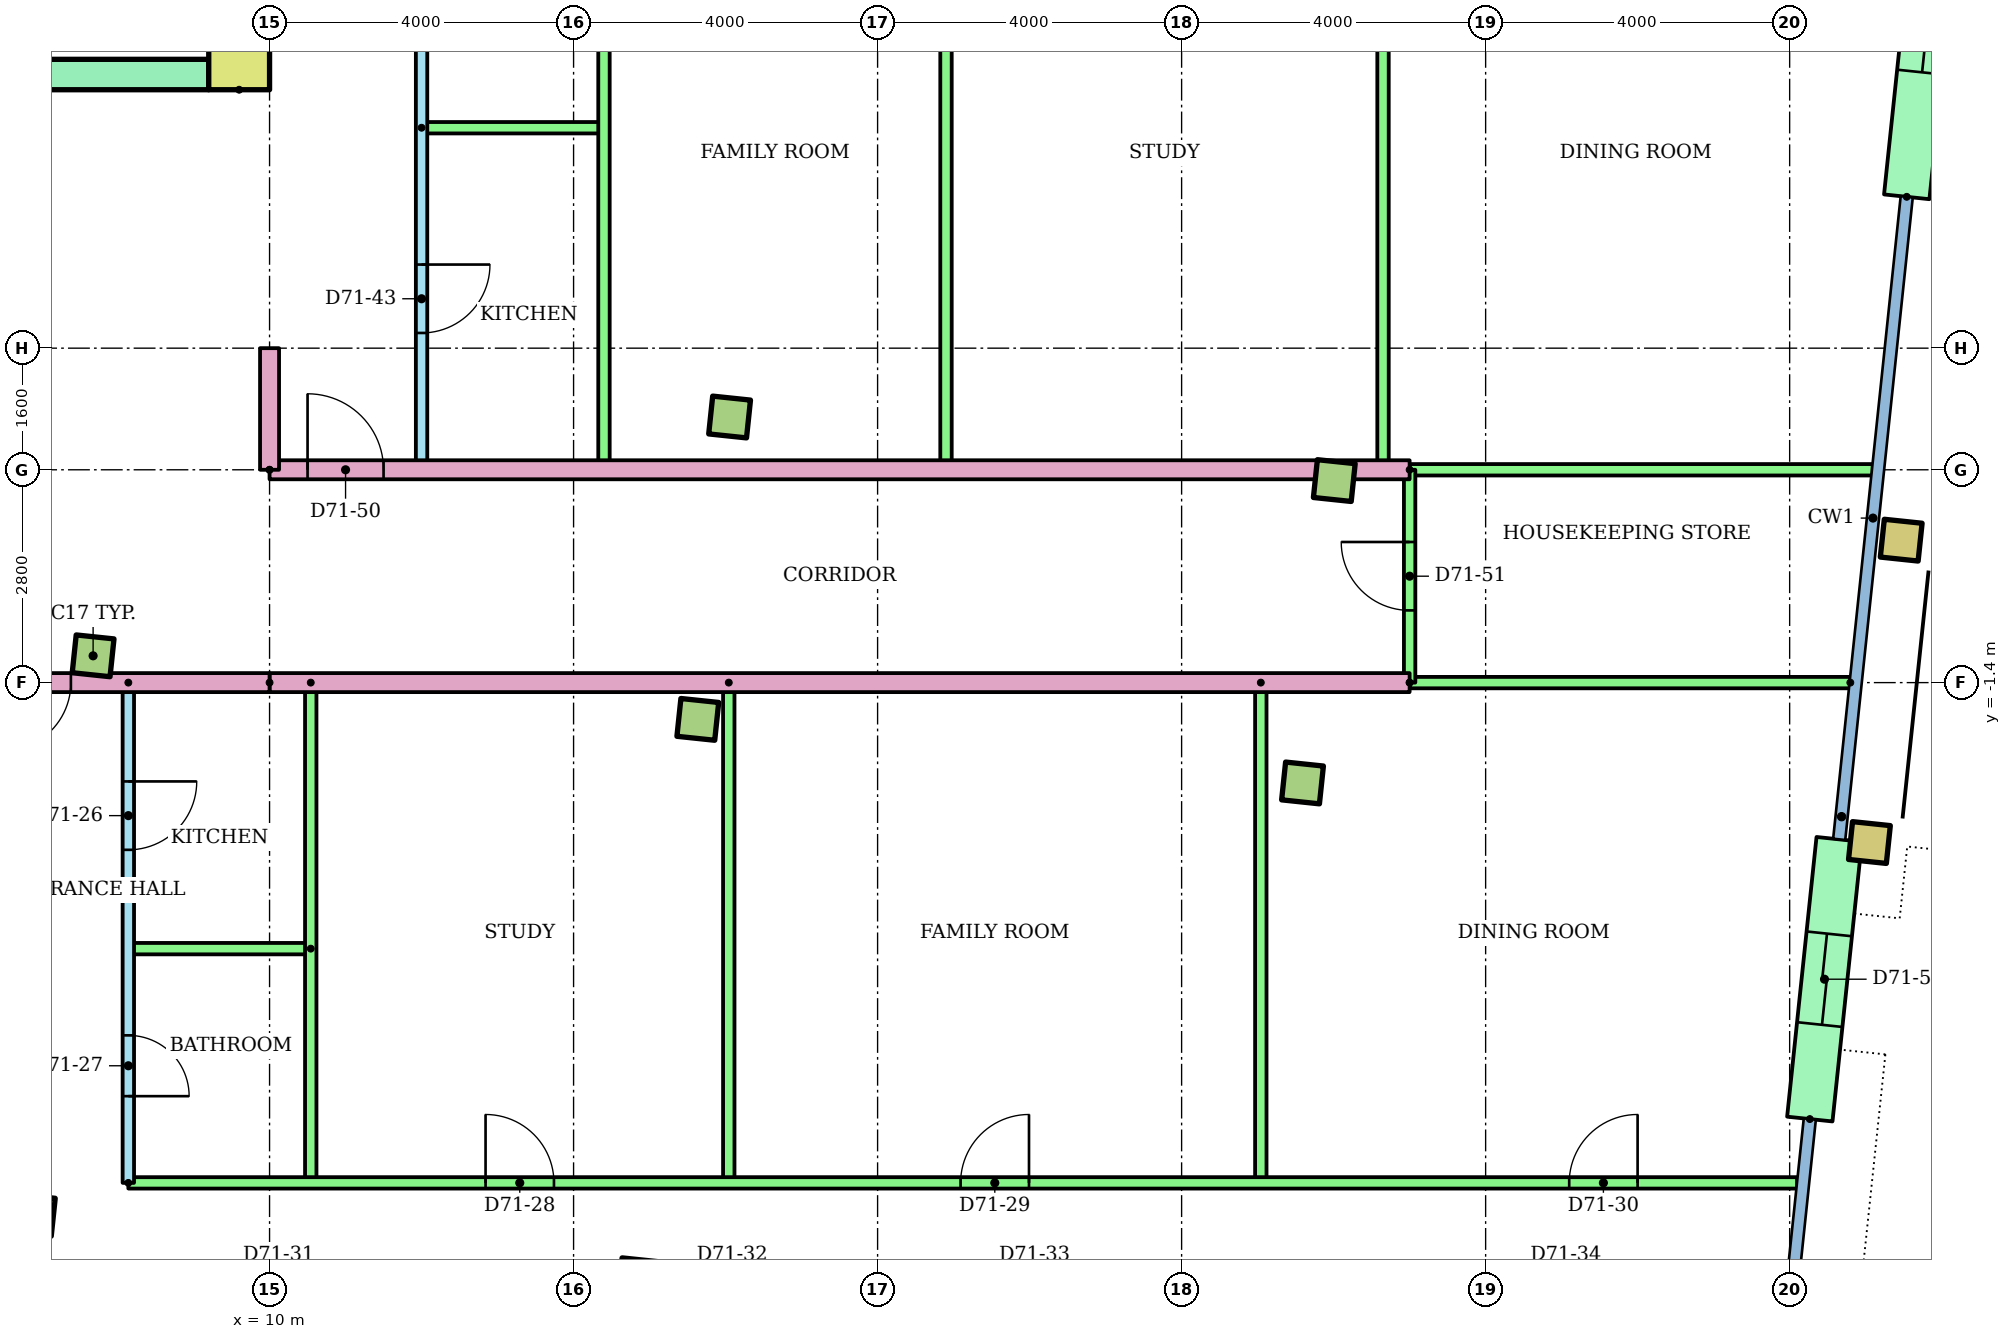
"""IFC4 building model, lengths in metres.
Left out: names, types, materials, properties, quantities, classifications, styles, units other than length and angle.
Written with IfcOpenShell. Run it as: python <this file> out.ifc"""

import sys

from ifc_helpers import new_model, si_unit, direction, frame, frame_2d, origin, origin_2d, place, context, subcontext, project, spatial, rectangle, hollow_rectangle, extrude, element, fill, save


model = new_model("IFC4")
c1 = context("Model", 3, precision=1e-05, world=origin(), true_north=direction((0.0, 1.0)))
c2 = subcontext(c1, "Body", "Model", "MODEL_VIEW")
j1 = project(units=[si_unit("LENGTHUNIT", "METRE"), si_unit("PLANEANGLEUNIT", "RADIAN")], contexts=[c1])
p1 = place(None, origin())
s1 = spatial("IfcSite", under=j1, at=p1, CompositionType="ELEMENT")
p2 = place(p1, origin())
s2 = spatial("IfcBuilding", under=s1, at=p2, CompositionType="ELEMENT")
p3 = place(p2, frame((0.0, 0.0, 272.3)))
s3 = spatial("IfcBuildingStorey", under=s2, at=p3, CompositionType="ELEMENT", Elevation=272.3)
for number, where, z_axis, x_axis in (
    (1, (6.905, -8.407, 0.0), (0.0, 0.0, 1.0), (0.995, -0.105, 0.0)),
    (2, (14.861, -9.243, 0.0), (0.0, 0.0, 1.0), (0.995, -0.105, 0.0)),
    (3, (7.678, -1.048, 0.0), (0.0, 0.0, 1.0), (0.995, -0.105, 0.0)),
    (4, (15.635, -1.884, 0.0), (0.0, 0.0, 1.0), (0.995, -0.105, 0.0)),
    (5, (23.591, -2.72, 0.0), (0.0, 0.0, 1.0), (0.995, -0.105, 0.0)),
):
    element("IfcColumn", number, at=place(p3, frame(where, z_axis=z_axis, x_axis=x_axis)), inside=s3, PredefinedType="COLUMN", context=c2, shape_type="SweptSolid", body=[
        extrude(rectangle(XDim=0.5, YDim=0.5, at=origin_2d()), origin(), (0.0, 0.0, 1.0), 3.2),
    ])
p4 = place(p3, frame((31.05, -3.504, 0.0), z_axis=(0.0, 0.0, 1.0), x_axis=(0.994521895368, -0.104528463268, 0.0)))
e6 = element("IfcColumn", 6, at=p4, inside=s3, PredefinedType="COLUMN", context=c2, shape_type="SweptSolid", body=[
    extrude(hollow_rectangle(XDim=0.5, YDim=0.5, WallThickness=0.025, at=origin_2d()), origin(), (0.0, 0.0, 1.0), 3.2),
])
for number, where, z_axis, x_axis in (
    (7, (16.053, 2.094, 0.0), (0.0, 0.0, 1.0), (0.995, -0.105, 0.0)),
    (8, (24.009, 1.258, 0.0), (0.0, 0.0, 1.0), (0.995, -0.105, 0.0)),
):
    element("IfcColumn", number, at=place(p3, frame(where, z_axis=z_axis, x_axis=x_axis)), inside=s3, PredefinedType="COLUMN", context=c2, shape_type="SweptSolid", body=[
        extrude(rectangle(XDim=0.5, YDim=0.5, at=origin_2d()), origin(), (0.0, 0.0, 1.0), 3.2),
    ])
p5 = place(p3, frame((31.468, 0.474, 0.0), z_axis=(0.0, 0.0, 1.0), x_axis=(0.994521895368, -0.104528463268, 0.0)))
e9 = element("IfcColumn", 9, at=p5, inside=s3, PredefinedType="COLUMN", context=c2, shape_type="SweptSolid", body=[
    extrude(hollow_rectangle(XDim=0.5, YDim=0.5, WallThickness=0.025, at=origin_2d()), origin(), (0.0, 0.0, 1.0), 3.2),
])
p6 = place(p3, frame((30.265, -7.142, 0.0), z_axis=(0.0, 0.0, 1.0), x_axis=(0.104513052986, 0.994523514933, 0.0)))
e10 = element("IfcWall", 10, at=p6, inside=s3, PredefinedType="STANDARD", context=c2, shape_type="SweptSolid", body=[
    extrude(rectangle(XDim=3.7, YDim=0.6, at=frame_2d((1.85, 0.0))), origin(), (0.0, 0.0, 1.0), 2.92),
])
p7 = place(p6, frame((1.25, 0.0, 0.0)))
e11 = element("IfcOpeningElement", 11, at=p7, cuts=e10, PredefinedType="OPENING", context=c2, shape_type="SweptSolid", body=[
    extrude(rectangle(XDim=1.2, YDim=2.1, at=frame_2d((0.6, 1.05))), frame((0.0, 0.31, 0.0), z_axis=(0.0, -1.0, 0.0), x_axis=(1.0, 0.0, 0.0)), (0.0, 0.0, 1.0), 0.62),
])
p8 = place(p3, frame((31.54, 4.991, 0.0), z_axis=(0.0, 0.0, 1.0), x_axis=(0.104546400045, 0.994520009974, 0.0)))
e12 = element("IfcWall", 12, at=p8, inside=s3, PredefinedType="STANDARD", context=c2, shape_type="SweptSolid", body=[
    extrude(rectangle(XDim=4.5, YDim=0.6, at=frame_2d((2.25, 0.0))), origin(), (0.0, 0.0, 1.0), 2.92),
])
p9 = place(p8, frame((1.65, 0.0, 0.0)))
e13 = element("IfcOpeningElement", 13, at=p9, cuts=e12, PredefinedType="OPENING", context=c2, shape_type="SweptSolid", body=[
    extrude(rectangle(XDim=1.2, YDim=2.1, at=frame_2d((0.6, 1.05))), frame((0.0, 0.31, 0.0), z_axis=(0.0, -1.0, 0.0), x_axis=(1.0, 0.0, 0.0)), (0.0, 0.0, 1.0), 0.62),
])
p10 = place(p3, frame((9.6, 6.4, 0.0), z_axis=(0.0, 0.0, 1.0), x_axis=(0.0, 1.0, 0.0)))
e14 = element("IfcWall", 14, at=p10, inside=s3, PredefinedType="SHEAR", context=c2, shape_type="SweptSolid", body=[
    extrude(rectangle(XDim=13.6, YDim=0.8, at=frame_2d((6.8, 0.0))), origin(), (0.0, 0.0, 1.0), 2.92),
])
p11 = place(p3, frame((-9.2, 6.6, 0.0)))
e15 = element("IfcWall", 15, at=p11, inside=s3, PredefinedType="SHEAR", context=c2, shape_type="SweptSolid", body=[
    extrude(rectangle(XDim=18.4, YDim=0.4, at=frame_2d((9.2, 0.0))), origin(), (0.0, 0.0, 1.0), 2.92),
])
p12 = place(p11, frame((8.3, 0.0, 0.0)))
e16 = element("IfcOpeningElement", 16, at=p12, cuts=e15, PredefinedType="OPENING", context=c2, shape_type="SweptSolid", body=[
    extrude(rectangle(XDim=1.8, YDim=2.1, at=frame_2d((0.9, 1.05))), frame((0.0, 0.21, 0.0), z_axis=(0.0, -1.0, 0.0), x_axis=(1.0, 0.0, 0.0)), (0.0, 0.0, 1.0), 0.42),
])
p13 = place(p11, frame((3.8, 0.0, 0.0)))
e17 = element("IfcOpeningElement", 17, at=p13, cuts=e15, PredefinedType="OPENING", context=c2, shape_type="SweptSolid", body=[
    extrude(rectangle(XDim=1.8, YDim=2.1, at=frame_2d((0.9, 1.05))), frame((0.0, 0.21, 0.0), z_axis=(0.0, -1.0, 0.0), x_axis=(1.0, 0.0, 0.0)), (0.0, 0.0, 1.0), 0.42),
])
p14 = place(p11, frame((12.8, 0.0, 0.0)))
e18 = element("IfcOpeningElement", 18, at=p14, cuts=e15, PredefinedType="OPENING", context=c2, shape_type="SweptSolid", body=[
    extrude(rectangle(XDim=1.8, YDim=2.1, at=frame_2d((0.9, 1.05))), frame((0.0, 0.21, 0.0), z_axis=(0.0, -1.0, 0.0), x_axis=(1.0, 0.0, 0.0)), (0.0, 0.0, 1.0), 0.42),
])
p15 = place(p3, frame((8.142, -1.4, 0.0), z_axis=(0.0, 0.0, 1.0), x_axis=(0.0, -1.0, 0.0)))
e19 = element("IfcWall", 19, at=p15, inside=s3, PredefinedType="PARTITIONING", context=c2, shape_type="SweptSolid", body=[
    extrude(rectangle(XDim=6.582, YDim=0.15, at=frame_2d((3.291, 0.0))), origin(), (0.0, 0.0, 1.0), 2.4),
])
p16 = place(p15, frame((1.3, 0.0, 0.0)))
e20 = element("IfcOpeningElement", 20, at=p16, cuts=e19, PredefinedType="OPENING", context=c2, shape_type="SweptSolid", body=[
    extrude(rectangle(XDim=0.9, YDim=2.1, at=frame_2d((0.45, 1.05))), frame((0.0, 0.085, 0.0), z_axis=(0.0, -1.0, 0.0), x_axis=(1.0, 0.0, 0.0)), (0.0, 0.0, 1.0), 0.17),
])
p17 = place(p15, frame((4.641, 0.0, 0.0)))
e21 = element("IfcOpeningElement", 21, at=p17, cuts=e19, PredefinedType="OPENING", context=c2, shape_type="SweptSolid", body=[
    extrude(rectangle(XDim=0.8, YDim=2.1, at=frame_2d((0.4, 1.05))), frame((0.0, 0.085, 0.0), z_axis=(0.0, -1.0, 0.0), x_axis=(1.0, 0.0, 0.0)), (0.0, 0.0, 1.0), 0.17),
])
p18 = place(p3, frame((10.542, -4.9, 0.0), z_axis=(0.0, 0.0, 1.0), x_axis=(-1.0, 0.0, 0.0)))
e22 = element("IfcWall", 22, at=p18, inside=s3, PredefinedType="PARTITIONING", context=c2, shape_type="SweptSolid", body=[
    extrude(rectangle(XDim=2.4, YDim=0.15, at=frame_2d((1.2, 0.0))), origin(), (0.0, 0.0, 1.0), 2.4),
])
for number, where, z_axis, x_axis in (
    (23, (10.542, -1.4, 0.0), (0.0, 0.0, 1.0), (0.0, -1.0, 0.0)),
    (24, (16.042, -1.4, 0.0), (0.0, 0.0, 1.0), (0.0, -1.0, 0.0)),
    (25, (23.042, -1.4, 0.0), (0.0, 0.0, 1.0), (0.0, -1.0, 0.0)),
):
    element("IfcWall", number, at=place(p3, frame(where, z_axis=z_axis, x_axis=x_axis)), inside=s3, PredefinedType="PARTITIONING", context=c2, shape_type="SweptSolid", body=[
        extrude(rectangle(XDim=6.582, YDim=0.15, at=frame_2d((3.291, 0.0))), origin(), (0.0, 0.0, 1.0), 2.4),
    ])
p19 = place(p3, frame((8.142, -7.982, 0.0)))
e26 = element("IfcWall", 26, at=p19, inside=s3, PredefinedType="PARTITIONING", context=c2, shape_type="SweptSolid", body=[
    extrude(rectangle(XDim=21.955, YDim=0.15, at=frame_2d((10.978, 0.0))), origin(), (0.0, 0.0, 1.0), 2.4),
])
p20 = place(p19, frame((4.7, 0.0, 0.0)))
e27 = element("IfcOpeningElement", 27, at=p20, cuts=e26, PredefinedType="OPENING", context=c2, shape_type="SweptSolid", body=[
    extrude(rectangle(XDim=0.9, YDim=2.1, at=frame_2d((0.45, 1.05))), frame((0.0, 0.085, 0.0), z_axis=(0.0, -1.0, 0.0), x_axis=(1.0, 0.0, 0.0)), (0.0, 0.0, 1.0), 0.17),
])
p21 = place(p19, frame((10.95, 0.0, 0.0)))
e28 = element("IfcOpeningElement", 28, at=p21, cuts=e26, PredefinedType="OPENING", context=c2, shape_type="SweptSolid", body=[
    extrude(rectangle(XDim=0.9, YDim=2.1, at=frame_2d((0.45, 1.05))), frame((0.0, 0.085, 0.0), z_axis=(0.0, -1.0, 0.0), x_axis=(1.0, 0.0, 0.0)), (0.0, 0.0, 1.0), 0.17),
])
p22 = place(p19, frame((18.958, 0.0, 0.0)))
e29 = element("IfcOpeningElement", 29, at=p22, cuts=e26, PredefinedType="OPENING", context=c2, shape_type="SweptSolid", body=[
    extrude(rectangle(XDim=0.9, YDim=2.1, at=frame_2d((0.45, 1.05))), frame((0.0, 0.085, 0.0), z_axis=(0.0, -1.0, 0.0), x_axis=(1.0, 0.0, 0.0)), (0.0, 0.0, 1.0), 0.17),
])
p23 = place(p3, frame((25.0, -1.4, 0.0), z_axis=(0.0, 0.0, 1.0), x_axis=(-1.0, 0.0, 0.0)))
e30 = element("IfcWall", 30, at=p23, inside=s3, PredefinedType="PARTITIONING", context=c2, shape_type="SweptSolid", body=[
    extrude(rectangle(XDim=15.0, YDim=0.25, at=frame_2d((7.5, 0.0))), origin(), (0.0, 0.0, 1.0), 2.4),
])
p24 = place(p3, frame((30.798, -1.4, 0.0), z_axis=(0.0, 0.0, 1.0), x_axis=(-1.0, 0.0, 0.0)))
e31 = element("IfcWall", 31, at=p24, inside=s3, PredefinedType="PARTITIONING", context=c2, shape_type="SweptSolid", body=[
    extrude(rectangle(XDim=5.798, YDim=0.15, at=frame_2d((2.899, 0.0))), origin(), (0.0, 0.0, 1.0), 2.4),
])
p25 = place(p3, frame((12.0, 9.743, 0.0), z_axis=(0.0, 0.0, 1.0), x_axis=(0.0, -1.0, 0.0)))
e32 = element("IfcWall", 32, at=p25, inside=s3, PredefinedType="PARTITIONING", context=c2, shape_type="SweptSolid", body=[
    extrude(rectangle(XDim=8.344, YDim=0.15, at=frame_2d((4.172, 0.0))), origin(), (0.0, 0.0, 1.0), 2.4),
])
p26 = place(p25, frame((5.643, 0.0, 0.0)))
e33 = element("IfcOpeningElement", 33, at=p26, cuts=e32, PredefinedType="OPENING", context=c2, shape_type="SweptSolid", body=[
    extrude(rectangle(XDim=0.9, YDim=2.1, at=frame_2d((0.45, 1.05))), frame((0.0, 0.085, 0.0), z_axis=(0.0, -1.0, 0.0), x_axis=(1.0, 0.0, 0.0)), (0.0, 0.0, 1.0), 0.17),
])
p27 = place(p25, frame((1.522, 0.0, 0.0)))
e34 = element("IfcOpeningElement", 34, at=p27, cuts=e32, PredefinedType="OPENING", context=c2, shape_type="SweptSolid", body=[
    extrude(rectangle(XDim=0.8, YDim=2.1, at=frame_2d((0.4, 1.05))), frame((0.0, 0.085, 0.0), z_axis=(0.0, -1.0, 0.0), x_axis=(1.0, 0.0, 0.0)), (0.0, 0.0, 1.0), 0.17),
])
p28 = place(p3, frame((12.0, 5.9, 0.0)))
e35 = element("IfcWall", 35, at=p28, inside=s3, PredefinedType="PARTITIONING", context=c2, shape_type="SweptSolid", body=[
    extrude(rectangle(XDim=2.4, YDim=0.15, at=frame_2d((1.2, 0.0))), origin(), (0.0, 0.0, 1.0), 2.4),
])
for number, where, z_axis, x_axis in (
    (36, (14.4, 9.743, 0.0), (0.0, 0.0, 1.0), (0.0, -1.0, 0.0)),
    (37, (18.9, 9.743, 0.0), (0.0, 0.0, 1.0), (0.0, -1.0, 0.0)),
    (38, (24.65, 9.743, 0.0), (0.0, 0.0, 1.0), (0.0, -1.0, 0.0)),
):
    element("IfcWall", number, at=place(p3, frame(where, z_axis=z_axis, x_axis=x_axis)), inside=s3, PredefinedType="PARTITIONING", context=c2, shape_type="SweptSolid", body=[
        extrude(rectangle(XDim=8.344, YDim=0.15, at=frame_2d((4.172, 0.0))), origin(), (0.0, 0.0, 1.0), 2.4),
    ])
p29 = place(p3, frame((10.0, 1.4, 0.0)))
e39 = element("IfcWall", 39, at=p29, inside=s3, PredefinedType="PARTITIONING", context=c2, shape_type="SweptSolid", body=[
    extrude(rectangle(XDim=15.0, YDim=0.25, at=frame_2d((7.5, 0.0))), origin(), (0.0, 0.0, 1.0), 2.4),
])
p30 = place(p29, frame((0.5, 0.0, 0.0)))
e40 = element("IfcOpeningElement", 40, at=p30, cuts=e39, PredefinedType="OPENING", context=c2, shape_type="SweptSolid", body=[
    extrude(rectangle(XDim=1.0, YDim=2.1, at=frame_2d((0.5, 1.05))), frame((0.0, 0.135, 0.0), z_axis=(0.0, -1.0, 0.0), x_axis=(1.0, 0.0, 0.0)), (0.0, 0.0, 1.0), 0.27),
])
p31 = place(p3, frame((25.0, 1.4, 0.0)))
e41 = element("IfcWall", 41, at=p31, inside=s3, PredefinedType="PARTITIONING", context=c2, shape_type="SweptSolid", body=[
    extrude(rectangle(XDim=6.093, YDim=0.15, at=frame_2d((3.046, 0.0))), origin(), (0.0, 0.0, 1.0), 2.4),
])
p32 = place(p3, frame((25.0, -1.4, 0.0), z_axis=(0.0, 0.0, 1.0), x_axis=(0.0, 1.0, 0.0)))
e42 = element("IfcWall", 42, at=p32, inside=s3, PredefinedType="PARTITIONING", context=c2, shape_type="SweptSolid", body=[
    extrude(rectangle(XDim=2.8, YDim=0.15, at=frame_2d((1.4, 0.0))), origin(), (0.0, 0.0, 1.0), 2.4),
])
p33 = place(p32, frame((0.95, 0.0, 0.0)))
e43 = element("IfcOpeningElement", 43, at=p33, cuts=e42, PredefinedType="OPENING", context=c2, shape_type="SweptSolid", body=[
    extrude(rectangle(XDim=0.9, YDim=2.1, at=frame_2d((0.45, 1.05))), frame((0.0, 0.085, 0.0), z_axis=(0.0, -1.0, 0.0), x_axis=(1.0, 0.0, 0.0)), (0.0, 0.0, 1.0), 0.17),
])
p34 = place(p3, frame((10.0, -1.4, 0.0), z_axis=(0.0, 0.0, 1.0), x_axis=(-1.0, 0.0, 0.0)))
e44 = element("IfcWall", 44, at=p34, inside=s3, PredefinedType="PARTITIONING", context=c2, shape_type="SweptSolid", body=[
    extrude(rectangle(XDim=20.0, YDim=0.25, at=frame_2d((10.0, 0.0))), origin(), (0.0, 0.0, 1.0), 2.4),
])
p35 = place(p34, frame((4.358, 0.0, 0.0)))
e45 = element("IfcOpeningElement", 45, at=p35, cuts=e44, PredefinedType="OPENING", context=c2, shape_type="SweptSolid", body=[
    extrude(rectangle(XDim=1.0, YDim=2.1, at=frame_2d((0.5, 1.05))), frame((0.0, 0.135, 0.0), z_axis=(0.0, -1.0, 0.0), x_axis=(1.0, 0.0, 0.0)), (0.0, 0.0, 1.0), 0.27),
])
p36 = place(p34, frame((2.614, 0.0, 0.0)))
e46 = element("IfcOpeningElement", 46, at=p36, cuts=e44, PredefinedType="OPENING", context=c2, shape_type="SweptSolid", body=[
    extrude(rectangle(XDim=0.9, YDim=2.1, at=frame_2d((0.45, 1.05))), frame((0.0, 0.135, 0.0), z_axis=(0.0, -1.0, 0.0), x_axis=(1.0, 0.0, 0.0)), (0.0, 0.0, 1.0), 0.27),
])
p37 = place(p3, frame((10.0, 1.4, 0.0), z_axis=(0.0, 0.0, 1.0), x_axis=(0.0, 1.0, 0.0)))
e47 = element("IfcWall", 47, at=p37, inside=s3, PredefinedType="PARTITIONING", context=c2, shape_type="SweptSolid", body=[
    extrude(rectangle(XDim=1.6, YDim=0.25, at=frame_2d((0.8, 0.0))), origin(), (0.0, 0.0, 1.0), 2.4),
])
p38 = place(p16, origin())
e48 = element("IfcDoor", 48, at=p38, inside=s3, OperationType="SINGLE_SWING_LEFT", PredefinedType="DOOR", context=c2, shape_type="SweptSolid", body=[
    extrude(rectangle(XDim=0.9, YDim=2.1, at=frame_2d((0.45, 1.05))), frame((0.0, 0.025, 0.0), z_axis=(0.0, -1.0, 0.0), x_axis=(1.0, 0.0, 0.0)), (0.0, 0.0, 1.0), 0.05),
])
fill(e20, e48)
p39 = place(p17, origin())
e49 = element("IfcDoor", 49, at=p39, inside=s3, OperationType="SINGLE_SWING_RIGHT", PredefinedType="DOOR", context=c2, shape_type="SweptSolid", body=[
    extrude(rectangle(XDim=0.8, YDim=2.1, at=frame_2d((0.4, 1.05))), frame((0.0, 0.025, 0.0), z_axis=(0.0, -1.0, 0.0), x_axis=(1.0, 0.0, 0.0)), (0.0, 0.0, 1.0), 0.05),
])
fill(e21, e49)
p40 = place(p20, origin())
e50 = element("IfcDoor", 50, at=p40, inside=s3, OperationType="SINGLE_SWING_LEFT", PredefinedType="DOOR", context=c2, shape_type="SweptSolid", body=[
    extrude(rectangle(XDim=0.9, YDim=2.1, at=frame_2d((0.45, 1.05))), frame((0.0, 0.025, 0.0), z_axis=(0.0, -1.0, 0.0), x_axis=(1.0, 0.0, 0.0)), (0.0, 0.0, 1.0), 0.05),
])
fill(e27, e50)
p41 = place(p21, origin())
e51 = element("IfcDoor", 51, at=p41, inside=s3, OperationType="SINGLE_SWING_RIGHT", PredefinedType="DOOR", context=c2, shape_type="SweptSolid", body=[
    extrude(rectangle(XDim=0.9, YDim=2.1, at=frame_2d((0.45, 1.05))), frame((0.0, 0.025, 0.0), z_axis=(0.0, -1.0, 0.0), x_axis=(1.0, 0.0, 0.0)), (0.0, 0.0, 1.0), 0.05),
])
fill(e28, e51)
p42 = place(p22, origin())
e52 = element("IfcDoor", 52, at=p42, inside=s3, OperationType="SINGLE_SWING_RIGHT", PredefinedType="DOOR", context=c2, shape_type="SweptSolid", body=[
    extrude(rectangle(XDim=0.9, YDim=2.1, at=frame_2d((0.45, 1.05))), frame((0.0, 0.025, 0.0), z_axis=(0.0, -1.0, 0.0), x_axis=(1.0, 0.0, 0.0)), (0.0, 0.0, 1.0), 0.05),
])
fill(e29, e52)
p43 = place(p36, origin())
e53 = element("IfcDoor", 53, at=p43, inside=s3, OperationType="SINGLE_SWING_RIGHT", PredefinedType="DOOR", context=c2, shape_type="SweptSolid", body=[
    extrude(rectangle(XDim=0.9, YDim=2.1, at=frame_2d((0.45, 1.05))), frame((0.0, 0.025, 0.0), z_axis=(0.0, -1.0, 0.0), x_axis=(1.0, 0.0, 0.0)), (0.0, 0.0, 1.0), 0.05),
])
fill(e46, e53)
p44 = place(p26, origin())
e54 = element("IfcDoor", 54, at=p44, inside=s3, OperationType="SINGLE_SWING_LEFT", PredefinedType="DOOR", context=c2, shape_type="SweptSolid", body=[
    extrude(rectangle(XDim=0.9, YDim=2.1, at=frame_2d((0.45, 1.05))), frame((0.0, 0.025, 0.0), z_axis=(0.0, -1.0, 0.0), x_axis=(1.0, 0.0, 0.0)), (0.0, 0.0, 1.0), 0.05),
])
fill(e33, e54)
p45 = place(p30, origin())
e55 = element("IfcDoor", 55, at=p45, inside=s3, OperationType="SINGLE_SWING_LEFT", PredefinedType="DOOR", context=c2, shape_type="SweptSolid", body=[
    extrude(rectangle(XDim=1.0, YDim=2.1, at=frame_2d((0.5, 1.05))), frame((0.0, 0.025, 0.0), z_axis=(0.0, -1.0, 0.0), x_axis=(1.0, 0.0, 0.0)), (0.0, 0.0, 1.0), 0.05),
])
fill(e40, e55)
p46 = place(p33, origin())
e56 = element("IfcDoor", 56, at=p46, inside=s3, OperationType="SINGLE_SWING_RIGHT", PredefinedType="DOOR", context=c2, shape_type="SweptSolid", body=[
    extrude(rectangle(XDim=0.9, YDim=2.1, at=frame_2d((0.45, 1.05))), frame((0.0, 0.025, 0.0), z_axis=(0.0, -1.0, 0.0), x_axis=(1.0, 0.0, 0.0)), (0.0, 0.0, 1.0), 0.05),
])
fill(e43, e56)
p47 = place(p7, origin())
e57 = element("IfcDoor", 57, at=p47, inside=s3, OperationType="SLIDING_TO_LEFT", PredefinedType="DOOR", context=c2, shape_type="SweptSolid", body=[
    extrude(rectangle(XDim=1.2, YDim=2.1, at=frame_2d((0.6, 1.05))), frame((0.0, 0.025, 0.0), z_axis=(0.0, -1.0, 0.0), x_axis=(1.0, 0.0, 0.0)), (0.0, 0.0, 1.0), 0.05),
])
fill(e11, e57)
p48 = place(p9, origin())
e58 = element("IfcDoor", 58, at=p48, inside=s3, OperationType="SLIDING_TO_LEFT", PredefinedType="DOOR", context=c2, shape_type="SweptSolid", body=[
    extrude(rectangle(XDim=1.2, YDim=2.1, at=frame_2d((0.6, 1.05))), frame((0.0, 0.025, 0.0), z_axis=(0.0, -1.0, 0.0), x_axis=(1.0, 0.0, 0.0)), (0.0, 0.0, 1.0), 0.05),
])
fill(e13, e58)
save(model, sys.argv[1])
